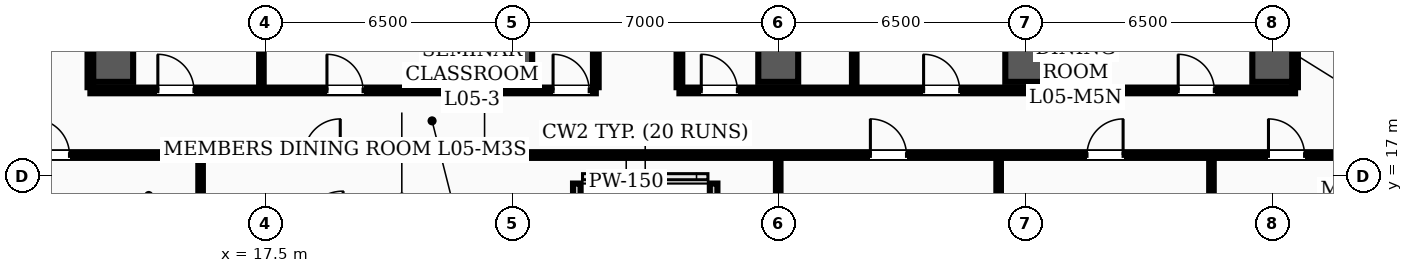
"""IFC4 building model, lengths in metres.
Left out: names, types, materials, properties, quantities, classifications, styles, units other than length and angle.
Written with IfcOpenShell. Run it as: python <this file> out.ifc"""

import sys

from ifc_helpers import new_model, si_unit, direction, frame, frame_2d, origin, origin_2d, place, context, subcontext, project, spatial, rectangle, hollow_rectangle, extrude, element, fill, save


model = new_model("IFC4")
c1 = context("Model", 3, precision=1e-05, world=origin(), true_north=direction((0.0, 1.0)))
c2 = subcontext(c1, "Body", "Model", "MODEL_VIEW")
j1 = project(units=[si_unit("LENGTHUNIT", "METRE"), si_unit("PLANEANGLEUNIT", "RADIAN")], contexts=[c1])
p1 = place(None, origin())
s1 = spatial("IfcSite", under=j1, at=p1, CompositionType="ELEMENT")
p2 = place(p1, origin())
s2 = spatial("IfcBuilding", under=s1, at=p2, CompositionType="ELEMENT")
p3 = place(p2, frame((0.0, 0.0, 22.0)))
s3 = spatial("IfcBuildingStorey", under=s2, at=p3, CompositionType="ELEMENT", Elevation=22.0)
for number, where, z_axis, x_axis in (
    (1, (13.5, 20.0, 0.0), (0.0, 0.0, 1.0), (1.0, 0.0, 0.0)),
    (2, (24.0, 20.0, 0.0), (0.0, 0.0, 1.0), (1.0, 0.0, 0.0)),
    (3, (31.0, 20.0, 0.0), (0.0, 0.0, 1.0), (1.0, 0.0, 0.0)),
    (4, (37.5, 20.0, 0.0), (0.0, 0.0, 1.0), (1.0, 0.0, 0.0)),
    (5, (44.0, 20.0, 0.0), (0.0, 0.0, 1.0), (1.0, 0.0, 0.0)),
):
    element("IfcColumn", number, at=place(p3, frame(where, z_axis=z_axis, x_axis=x_axis)), inside=s3, PredefinedType="COLUMN", context=c2, shape_type="SweptSolid", body=[
        extrude(hollow_rectangle(XDim=1.05, YDim=1.05, WallThickness=0.038, InnerFilletRadius=0.019, OuterFilletRadius=0.057, at=origin_2d()), origin(), (0.0, 0.0, 1.0), 4.5),
    ])
for number, where, z_axis, x_axis in (
    (6, (25.7, 15.1, 0.0), (0.0, 0.0, 1.0), (0.0, 1.0, 0.0)),
    (7, (29.3, 16.8, 0.0), (0.0, 0.0, 1.0), (0.0, -1.0, 0.0)),
):
    element("IfcWall", number, at=place(p3, frame(where, z_axis=z_axis, x_axis=x_axis)), inside=s3, PredefinedType="PARAPET", context=c2, shape_type="SweptSolid", body=[
        extrude(rectangle(XDim=1.7, YDim=0.2, at=frame_2d((0.85, 0.0))), origin(), (0.0, 0.0, 1.0), 1.2),
    ])
p4 = place(p3, frame((4.66, 17.55, 0.0), z_axis=(0.0, 0.0, 1.0), x_axis=(1.0, 0.0, 0.0)))
e8 = element("IfcWall", 8, at=p4, inside=s3, PredefinedType="PARTITIONING", context=c2, shape_type="SweptSolid", body=[
    extrude(rectangle(XDim=44.68, YDim=0.15, at=frame_2d((22.34, 0.0))), origin(), (0.0, 0.0, 1.0), 3.7),
])
p5 = place(p4, frame((6.74, 0.0, 0.0)))
e9 = element("IfcOpeningElement", 9, at=p5, cuts=e8, PredefinedType="OPENING", context=c2, shape_type="SweptSolid", body=[
    extrude(rectangle(XDim=0.95, YDim=2.08, at=frame_2d((0.475, 1.04))), frame((0.0, 0.085, 0.0), z_axis=(0.0, -1.0, 0.0), x_axis=(1.0, 0.0, 0.0)), (0.0, 0.0, 1.0), 0.17),
])
p6 = place(p4, frame((13.865, 0.0, 0.0)))
e10 = element("IfcOpeningElement", 10, at=p6, cuts=e8, PredefinedType="OPENING", context=c2, shape_type="SweptSolid", body=[
    extrude(rectangle(XDim=0.95, YDim=2.08, at=frame_2d((0.475, 1.04))), frame((0.0, 0.085, 0.0), z_axis=(0.0, -1.0, 0.0), x_axis=(1.0, 0.0, 0.0)), (0.0, 0.0, 1.0), 0.17),
])
p7 = place(p4, frame((28.765, 0.0, 0.0)))
e11 = element("IfcOpeningElement", 11, at=p7, cuts=e8, PredefinedType="OPENING", context=c2, shape_type="SweptSolid", body=[
    extrude(rectangle(XDim=0.95, YDim=2.08, at=frame_2d((0.475, 1.04))), frame((0.0, 0.085, 0.0), z_axis=(0.0, -1.0, 0.0), x_axis=(1.0, 0.0, 0.0)), (0.0, 0.0, 1.0), 0.17),
])
p8 = place(p4, frame((34.465, 0.0, 0.0)))
e12 = element("IfcOpeningElement", 12, at=p8, cuts=e8, PredefinedType="OPENING", context=c2, shape_type="SweptSolid", body=[
    extrude(rectangle(XDim=0.95, YDim=2.08, at=frame_2d((0.475, 1.04))), frame((0.0, 0.085, 0.0), z_axis=(0.0, -1.0, 0.0), x_axis=(1.0, 0.0, 0.0)), (0.0, 0.0, 1.0), 0.17),
])
p9 = place(p4, frame((39.24, 0.0, 0.0)))
e13 = element("IfcOpeningElement", 13, at=p9, cuts=e8, PredefinedType="OPENING", context=c2, shape_type="SweptSolid", body=[
    extrude(rectangle(XDim=0.95, YDim=2.08, at=frame_2d((0.475, 1.04))), frame((0.0, 0.085, 0.0), z_axis=(0.0, -1.0, 0.0), x_axis=(1.0, 0.0, 0.0)), (0.0, 0.0, 1.0), 0.17),
])
p10 = place(p3, frame((12.9, 19.25, 0.0), z_axis=(0.0, 0.0, 1.0), x_axis=(1.0, 0.0, 0.0)))
e14 = element("IfcWall", 14, at=p10, inside=s3, PredefinedType="PARTITIONING", context=c2, shape_type="SweptSolid", body=[
    extrude(rectangle(XDim=13.3, YDim=0.15, at=frame_2d((6.65, 0.0))), origin(), (0.0, 0.0, 1.0), 3.7),
])
p11 = place(p10, frame((1.775, 0.0, 0.0)))
e15 = element("IfcOpeningElement", 15, at=p11, cuts=e14, PredefinedType="OPENING", context=c2, shape_type="SweptSolid", body=[
    extrude(rectangle(XDim=0.95, YDim=2.08, at=frame_2d((0.475, 1.04))), frame((0.0, 0.085, 0.0), z_axis=(0.0, -1.0, 0.0), x_axis=(1.0, 0.0, 0.0)), (0.0, 0.0, 1.0), 0.17),
])
p12 = place(p10, frame((6.225, 0.0, 0.0)))
e16 = element("IfcOpeningElement", 16, at=p12, cuts=e14, PredefinedType="OPENING", context=c2, shape_type="SweptSolid", body=[
    extrude(rectangle(XDim=0.95, YDim=2.08, at=frame_2d((0.475, 1.04))), frame((0.0, 0.085, 0.0), z_axis=(0.0, -1.0, 0.0), x_axis=(1.0, 0.0, 0.0)), (0.0, 0.0, 1.0), 0.17),
])
p13 = place(p10, frame((12.175, 0.0, 0.0)))
e17 = element("IfcOpeningElement", 17, at=p13, cuts=e14, PredefinedType="OPENING", context=c2, shape_type="SweptSolid", body=[
    extrude(rectangle(XDim=0.95, YDim=2.08, at=frame_2d((0.475, 1.04))), frame((0.0, 0.085, 0.0), z_axis=(0.0, -1.0, 0.0), x_axis=(1.0, 0.0, 0.0)), (0.0, 0.0, 1.0), 0.17),
])
p14 = place(p3, frame((28.4, 19.25, 0.0), z_axis=(0.0, 0.0, 1.0), x_axis=(1.0, 0.0, 0.0)))
e18 = element("IfcWall", 18, at=p14, inside=s3, PredefinedType="PARTITIONING", context=c2, shape_type="SweptSolid", body=[
    extrude(rectangle(XDim=16.2, YDim=0.15, at=frame_2d((8.1, 0.0))), origin(), (0.0, 0.0, 1.0), 3.7),
])
p15 = place(p14, frame((0.575, 0.0, 0.0)))
e19 = element("IfcOpeningElement", 19, at=p15, cuts=e18, PredefinedType="OPENING", context=c2, shape_type="SweptSolid", body=[
    extrude(rectangle(XDim=0.95, YDim=2.08, at=frame_2d((0.475, 1.04))), frame((0.0, 0.085, 0.0), z_axis=(0.0, -1.0, 0.0), x_axis=(1.0, 0.0, 0.0)), (0.0, 0.0, 1.0), 0.17),
])
p16 = place(p14, frame((6.425, 0.0, 0.0)))
e20 = element("IfcOpeningElement", 20, at=p16, cuts=e18, PredefinedType="OPENING", context=c2, shape_type="SweptSolid", body=[
    extrude(rectangle(XDim=0.95, YDim=2.08, at=frame_2d((0.475, 1.04))), frame((0.0, 0.085, 0.0), z_axis=(0.0, -1.0, 0.0), x_axis=(1.0, 0.0, 0.0)), (0.0, 0.0, 1.0), 0.17),
])
p17 = place(p14, frame((13.125, 0.0, 0.0)))
e21 = element("IfcOpeningElement", 21, at=p17, cuts=e18, PredefinedType="OPENING", context=c2, shape_type="SweptSolid", body=[
    extrude(rectangle(XDim=0.95, YDim=2.08, at=frame_2d((0.475, 1.04))), frame((0.0, 0.085, 0.0), z_axis=(0.0, -1.0, 0.0), x_axis=(1.0, 0.0, 0.0)), (0.0, 0.0, 1.0), 0.17),
])
for number, where, z_axis, x_axis in (
    (22, (26.2, 19.335, 0.0), (0.0, 0.0, 1.0), (0.0, 1.0, 0.0)),
    (23, (28.4, 19.335, 0.0), (0.0, 0.0, 1.0), (0.0, 1.0, 0.0)),
    (24, (12.9, 19.335, 0.0), (0.0, 0.0, 1.0), (0.0, 1.0, 0.0)),
    (25, (44.6, 19.335, 0.0), (0.0, 0.0, 1.0), (0.0, 1.0, 0.0)),
):
    element("IfcWall", number, at=place(p3, frame(where, z_axis=z_axis, x_axis=x_axis)), inside=s3, PredefinedType="PARTITIONING", context=c2, shape_type="SweptSolid", body=[
        extrude(rectangle(XDim=7.38, YDim=0.15, at=frame_2d((3.69, 0.0))), origin(), (0.0, 0.0, 1.0), 3.6),
    ])
p18 = place(p3, frame((15.8, 15.31, 0.0), z_axis=(0.0, 0.0, 1.0), x_axis=(0.0, 1.0, 0.0)))
e26 = element("IfcWall", 26, at=p18, inside=s3, PredefinedType="PARTITIONING", context=c2, shape_type="SweptSolid", body=[
    extrude(rectangle(XDim=2.155, YDim=0.12, at=frame_2d((1.078, 0.0))), origin(), (0.0, 0.0, 1.0), 3.812),
])
p19 = place(p3, frame((31.0, 15.31, 0.0), z_axis=(0.0, 0.0, 1.0), x_axis=(0.0, 1.0, 0.0)))
e27 = element("IfcWall", 27, at=p19, inside=s3, PredefinedType="PARTITIONING", context=c2, shape_type="SweptSolid", body=[
    extrude(rectangle(XDim=2.155, YDim=0.12, at=frame_2d((1.078, 0.0))), origin(), (0.0, 0.0, 1.0), 3.7),
])
for number, where, z_axis, x_axis in (
    (28, (36.8, 15.31, 0.0), (0.0, 0.0, 1.0), (0.0, 1.0, 0.0)),
    (29, (42.4, 15.31, 0.0), (0.0, 0.0, 1.0), (0.0, 1.0, 0.0)),
):
    element("IfcWall", number, at=place(p3, frame(where, z_axis=z_axis, x_axis=x_axis)), inside=s3, PredefinedType="PARTITIONING", context=c2, shape_type="SweptSolid", body=[
        extrude(rectangle(XDim=2.155, YDim=0.12, at=frame_2d((1.078, 0.0))), origin(), (0.0, 0.0, 1.0), 3.812),
    ])
for number, where, z_axis, x_axis in (
    (30, (17.4, 19.335, 0.0), (0.0, 0.0, 1.0), (0.0, 1.0, 0.0)),
    (31, (21.8, 19.335, 0.0), (0.0, 0.0, 1.0), (0.0, 1.0, 0.0)),
    (32, (33.0, 19.335, 0.0), (0.0, 0.0, 1.0), (0.0, 1.0, 0.0)),
    (33, (39.4, 19.335, 0.0), (0.0, 0.0, 1.0), (0.0, 1.0, 0.0)),
):
    element("IfcWall", number, at=place(p3, frame(where, z_axis=z_axis, x_axis=x_axis)), inside=s3, PredefinedType="PARTITIONING", context=c2, shape_type="SweptSolid", body=[
        extrude(rectangle(XDim=7.38, YDim=0.12, at=frame_2d((3.69, 0.0))), origin(), (0.0, 0.0, 1.0), 3.6),
    ])
p20 = place(p5, origin())
e34 = element("IfcDoor", 34, at=p20, inside=s3, OperationType="SINGLE_SWING_LEFT", PredefinedType="DOOR", context=c2, shape_type="SweptSolid", body=[
    extrude(rectangle(XDim=0.95, YDim=2.08, at=frame_2d((0.475, 1.04))), frame((0.0, 0.025, 0.0), z_axis=(0.0, -1.0, 0.0), x_axis=(1.0, 0.0, 0.0)), (0.0, 0.0, 1.0), 0.05),
])
fill(e9, e34)
p21 = place(p6, origin())
e35 = element("IfcDoor", 35, at=p21, inside=s3, OperationType="SINGLE_SWING_RIGHT", PredefinedType="DOOR", context=c2, shape_type="SweptSolid", body=[
    extrude(rectangle(XDim=0.95, YDim=2.08, at=frame_2d((0.475, 1.04))), frame((0.0, 0.025, 0.0), z_axis=(0.0, -1.0, 0.0), x_axis=(1.0, 0.0, 0.0)), (0.0, 0.0, 1.0), 0.05),
])
fill(e10, e35)
p22 = place(p7, origin())
e36 = element("IfcDoor", 36, at=p22, inside=s3, OperationType="SINGLE_SWING_LEFT", PredefinedType="DOOR", context=c2, shape_type="SweptSolid", body=[
    extrude(rectangle(XDim=0.95, YDim=2.08, at=frame_2d((0.475, 1.04))), frame((0.0, 0.025, 0.0), z_axis=(0.0, -1.0, 0.0), x_axis=(1.0, 0.0, 0.0)), (0.0, 0.0, 1.0), 0.05),
])
fill(e11, e36)
p23 = place(p8, origin())
e37 = element("IfcDoor", 37, at=p23, inside=s3, OperationType="SINGLE_SWING_RIGHT", PredefinedType="DOOR", context=c2, shape_type="SweptSolid", body=[
    extrude(rectangle(XDim=0.95, YDim=2.08, at=frame_2d((0.475, 1.04))), frame((0.0, 0.025, 0.0), z_axis=(0.0, -1.0, 0.0), x_axis=(1.0, 0.0, 0.0)), (0.0, 0.0, 1.0), 0.05),
])
fill(e12, e37)
p24 = place(p9, origin())
e38 = element("IfcDoor", 38, at=p24, inside=s3, OperationType="SINGLE_SWING_LEFT", PredefinedType="DOOR", context=c2, shape_type="SweptSolid", body=[
    extrude(rectangle(XDim=0.95, YDim=2.08, at=frame_2d((0.475, 1.04))), frame((0.0, 0.025, 0.0), z_axis=(0.0, -1.0, 0.0), x_axis=(1.0, 0.0, 0.0)), (0.0, 0.0, 1.0), 0.05),
])
fill(e13, e38)
p25 = place(p11, origin())
e39 = element("IfcDoor", 39, at=p25, inside=s3, OperationType="SINGLE_SWING_LEFT", PredefinedType="DOOR", context=c2, shape_type="SweptSolid", body=[
    extrude(rectangle(XDim=0.95, YDim=2.08, at=frame_2d((0.475, 1.04))), frame((0.0, 0.025, 0.0), z_axis=(0.0, -1.0, 0.0), x_axis=(1.0, 0.0, 0.0)), (0.0, 0.0, 1.0), 0.05),
])
fill(e15, e39)
p26 = place(p12, origin())
e40 = element("IfcDoor", 40, at=p26, inside=s3, OperationType="SINGLE_SWING_LEFT", PredefinedType="DOOR", context=c2, shape_type="SweptSolid", body=[
    extrude(rectangle(XDim=0.95, YDim=2.08, at=frame_2d((0.475, 1.04))), frame((0.0, 0.025, 0.0), z_axis=(0.0, -1.0, 0.0), x_axis=(1.0, 0.0, 0.0)), (0.0, 0.0, 1.0), 0.05),
])
fill(e16, e40)
p27 = place(p13, origin())
e41 = element("IfcDoor", 41, at=p27, inside=s3, OperationType="SINGLE_SWING_LEFT", PredefinedType="DOOR", context=c2, shape_type="SweptSolid", body=[
    extrude(rectangle(XDim=0.95, YDim=2.08, at=frame_2d((0.475, 1.04))), frame((0.0, 0.025, 0.0), z_axis=(0.0, -1.0, 0.0), x_axis=(1.0, 0.0, 0.0)), (0.0, 0.0, 1.0), 0.05),
])
fill(e17, e41)
p28 = place(p15, origin())
e42 = element("IfcDoor", 42, at=p28, inside=s3, OperationType="SINGLE_SWING_LEFT", PredefinedType="DOOR", context=c2, shape_type="SweptSolid", body=[
    extrude(rectangle(XDim=0.95, YDim=2.08, at=frame_2d((0.475, 1.04))), frame((0.0, 0.025, 0.0), z_axis=(0.0, -1.0, 0.0), x_axis=(1.0, 0.0, 0.0)), (0.0, 0.0, 1.0), 0.05),
])
fill(e19, e42)
p29 = place(p16, origin())
e43 = element("IfcDoor", 43, at=p29, inside=s3, OperationType="SINGLE_SWING_LEFT", PredefinedType="DOOR", context=c2, shape_type="SweptSolid", body=[
    extrude(rectangle(XDim=0.95, YDim=2.08, at=frame_2d((0.475, 1.04))), frame((0.0, 0.025, 0.0), z_axis=(0.0, -1.0, 0.0), x_axis=(1.0, 0.0, 0.0)), (0.0, 0.0, 1.0), 0.05),
])
fill(e20, e43)
p30 = place(p17, origin())
e44 = element("IfcDoor", 44, at=p30, inside=s3, OperationType="SINGLE_SWING_LEFT", PredefinedType="DOOR", context=c2, shape_type="SweptSolid", body=[
    extrude(rectangle(XDim=0.95, YDim=2.08, at=frame_2d((0.475, 1.04))), frame((0.0, 0.025, 0.0), z_axis=(0.0, -1.0, 0.0), x_axis=(1.0, 0.0, 0.0)), (0.0, 0.0, 1.0), 0.05),
])
fill(e21, e44)
save(model, sys.argv[1])
